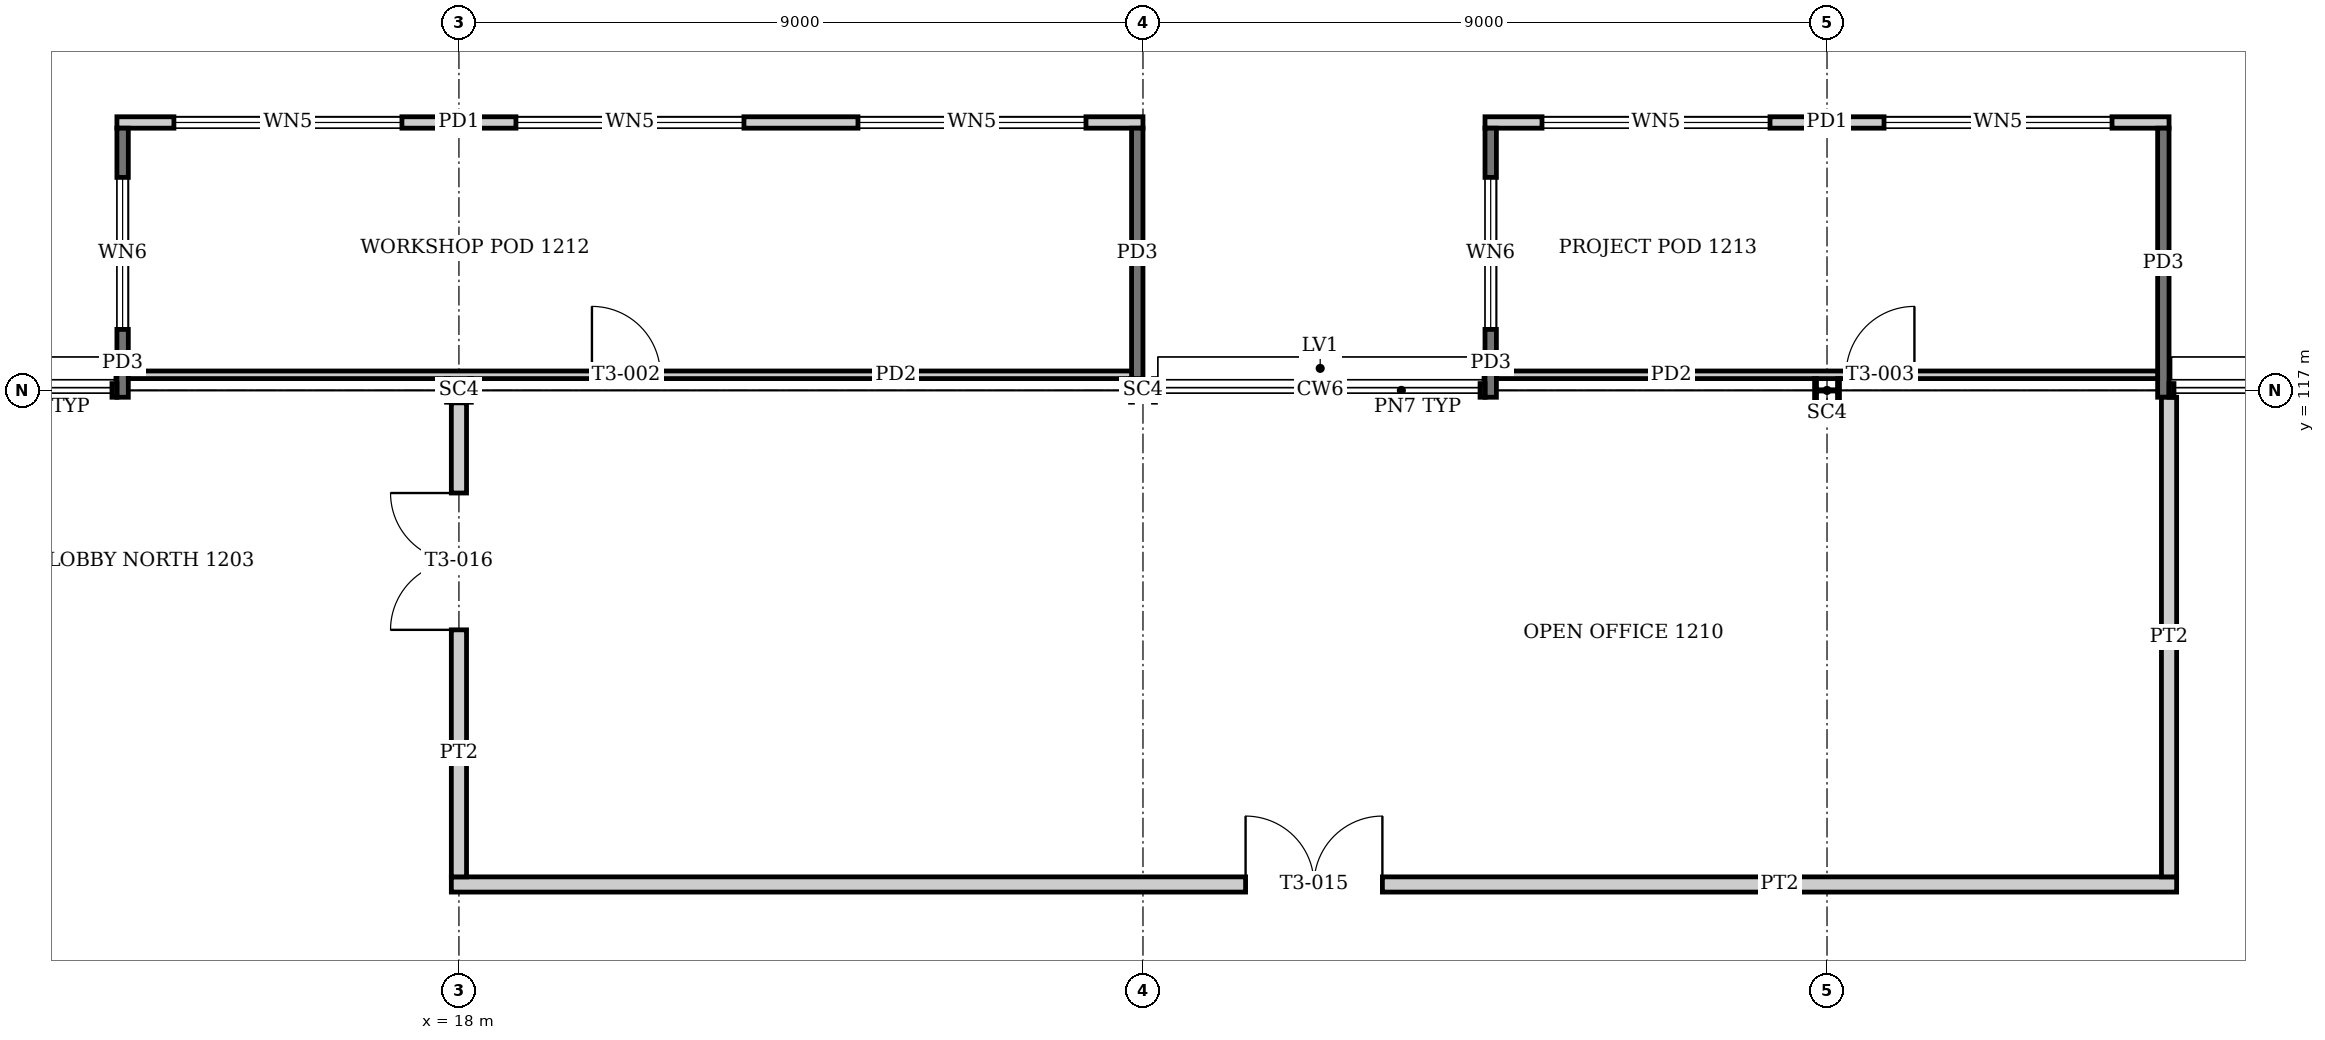
"""IFC4 building model, lengths in metres.
Left out: names, types, materials, properties, quantities, classifications, styles, units other than length and angle.
Written with IfcOpenShell. Run it as: python <this file> out.ifc"""

import sys

from ifc_helpers import new_model, si_unit, direction, frame, frame_2d, origin, origin_2d, place, context, subcontext, project, spatial, rectangle, i_section, extrude, element, fill, save


model = new_model("IFC4")
c1 = context("Model", 3, precision=1e-05, world=origin(), true_north=direction((0.0, 1.0)))
c2 = subcontext(c1, "Body", "Model", "MODEL_VIEW")
j1 = project(units=[si_unit("LENGTHUNIT", "METRE"), si_unit("PLANEANGLEUNIT", "RADIAN")], contexts=[c1])
p1 = place(None, origin())
s1 = spatial("IfcSite", under=j1, at=p1, CompositionType="ELEMENT")
p2 = place(p1, origin())
s2 = spatial("IfcBuilding", under=s1, at=p2, CompositionType="ELEMENT")
p3 = place(p2, frame((0.0, 0.0, 51.2)))
s3 = spatial("IfcBuildingStorey", under=s2, at=p3, CompositionType="ELEMENT", Elevation=51.2)
for number, where, z_axis, x_axis in (
    (1, (18.0, 117.0, 0.0), (0.0, 0.0, 1.0), (0.0, 1.0, 0.0)),
    (2, (27.0, 117.0, 0.0), (0.0, 0.0, 1.0), (0.0, 1.0, 0.0)),
    (3, (36.0, 117.0, 0.0), (0.0, 0.0, 1.0), (0.0, 1.0, 0.0)),
):
    element("IfcColumn", number, at=place(p3, frame(where, z_axis=z_axis, x_axis=x_axis)), inside=s3, PredefinedType="COLUMN", context=c2, shape_type="SweptSolid", body=[
        extrude(i_section(OverallWidth=0.311, OverallDepth=0.327, WebThickness=0.016, FlangeThickness=0.025, at=origin_2d()), origin(), (0.0, 0.0, 1.0), 4.0),
    ])
p4 = place(p3, frame((13.5, 120.525, 0.0), z_axis=(0.0, 0.0, 1.0), x_axis=(1.0, 0.0, 0.0)))
e4 = element("IfcWall", 4, at=p4, inside=s3, PredefinedType="SOLIDWALL", context=c2, shape_type="SweptSolid", body=[
    extrude(rectangle(XDim=13.5, YDim=0.15, at=frame_2d((6.75, 0.0))), origin(), (0.0, 0.0, 1.0), 2.6),
])
p5 = place(p4, frame((0.75, 0.0, 0.9)))
e5 = element("IfcOpeningElement", 5, at=p5, cuts=e4, PredefinedType="OPENING", context=c2, shape_type="SweptSolid", body=[
    extrude(rectangle(XDim=3.0, YDim=1.4, at=frame_2d((1.5, 0.7))), frame((0.0, 0.085, 0.0), z_axis=(0.0, -1.0, 0.0), x_axis=(1.0, 0.0, 0.0)), (0.0, 0.0, 1.0), 0.17),
])
p6 = place(p4, frame((5.25, 0.0, 0.9)))
e6 = element("IfcOpeningElement", 6, at=p6, cuts=e4, PredefinedType="OPENING", context=c2, shape_type="SweptSolid", body=[
    extrude(rectangle(XDim=3.0, YDim=1.4, at=frame_2d((1.5, 0.7))), frame((0.0, 0.085, 0.0), z_axis=(0.0, -1.0, 0.0), x_axis=(1.0, 0.0, 0.0)), (0.0, 0.0, 1.0), 0.17),
])
p7 = place(p4, frame((9.75, 0.0, 0.9)))
e7 = element("IfcOpeningElement", 7, at=p7, cuts=e4, PredefinedType="OPENING", context=c2, shape_type="SweptSolid", body=[
    extrude(rectangle(XDim=3.0, YDim=1.4, at=frame_2d((1.5, 0.7))), frame((0.0, 0.085, 0.0), z_axis=(0.0, -1.0, 0.0), x_axis=(1.0, 0.0, 0.0)), (0.0, 0.0, 1.0), 0.17),
])
p8 = place(p3, frame((13.575, 120.45, -0.15), z_axis=(0.0, 0.0, 1.0), x_axis=(0.0, -1.0, 0.0)))
e8 = element("IfcWall", 8, at=p8, inside=s3, PredefinedType="SOLIDWALL", context=c2, shape_type="SweptSolid", body=[
    extrude(rectangle(XDim=3.54, YDim=0.15, at=frame_2d((1.77, 0.0))), origin(), (0.0, 0.0, 1.0), 2.75),
])
p9 = place(p8, frame((0.647, 0.0, 1.05)))
e9 = element("IfcOpeningElement", 9, at=p9, cuts=e8, PredefinedType="OPENING", context=c2, shape_type="SweptSolid", body=[
    extrude(rectangle(XDim=2.0, YDim=1.4, at=frame_2d((1.0, 0.7))), frame((0.0, 0.085, 0.0), z_axis=(0.0, -1.0, 0.0), x_axis=(1.0, 0.0, 0.0)), (0.0, 0.0, 1.0), 0.17),
])
p10 = place(p3, frame((26.925, 120.45, -0.15), z_axis=(0.0, 0.0, 1.0), x_axis=(0.0, -1.0, 0.0)))
e10 = element("IfcWall", 10, at=p10, inside=s3, PredefinedType="SOLIDWALL", context=c2, shape_type="SweptSolid", body=[
    extrude(rectangle(XDim=3.294, YDim=0.15, at=frame_2d((1.647, 0.0))), origin(), (0.0, 0.0, 1.0), 2.75),
])
p11 = place(p3, frame((13.65, 117.206, 0.0), z_axis=(0.0, 0.0, 1.0), x_axis=(1.0, 0.0, 0.0)))
e11 = element("IfcWall", 11, at=p11, inside=s3, PredefinedType="PARTITIONING", context=c2, shape_type="SweptSolid", body=[
    extrude(rectangle(XDim=13.2, YDim=0.1, at=frame_2d((6.6, 0.0))), origin(), (0.0, 0.0, 1.0), 2.6),
])
p12 = place(p11, frame((6.1, 0.0, 0.0)))
e12 = element("IfcOpeningElement", 12, at=p12, cuts=e11, PredefinedType="OPENING", context=c2, shape_type="SweptSolid", body=[
    extrude(rectangle(XDim=0.9, YDim=2.1, at=frame_2d((0.45, 1.05))), frame((0.0, 0.06, 0.0), z_axis=(0.0, -1.0, 0.0), x_axis=(1.0, 0.0, 0.0)), (0.0, 0.0, 1.0), 0.12),
])
p13 = place(p3, frame((31.5, 120.525, 0.0), z_axis=(0.0, 0.0, 1.0), x_axis=(1.0, 0.0, 0.0)))
e13 = element("IfcWall", 13, at=p13, inside=s3, PredefinedType="SOLIDWALL", context=c2, shape_type="SweptSolid", body=[
    extrude(rectangle(XDim=9.0, YDim=0.15, at=frame_2d((4.5, 0.0))), origin(), (0.0, 0.0, 1.0), 2.6),
])
p14 = place(p13, frame((0.75, 0.0, 0.9)))
e14 = element("IfcOpeningElement", 14, at=p14, cuts=e13, PredefinedType="OPENING", context=c2, shape_type="SweptSolid", body=[
    extrude(rectangle(XDim=3.0, YDim=1.4, at=frame_2d((1.5, 0.7))), frame((0.0, 0.085, 0.0), z_axis=(0.0, -1.0, 0.0), x_axis=(1.0, 0.0, 0.0)), (0.0, 0.0, 1.0), 0.17),
])
p15 = place(p13, frame((5.25, 0.0, 0.9)))
e15 = element("IfcOpeningElement", 15, at=p15, cuts=e13, PredefinedType="OPENING", context=c2, shape_type="SweptSolid", body=[
    extrude(rectangle(XDim=3.0, YDim=1.4, at=frame_2d((1.5, 0.7))), frame((0.0, 0.085, 0.0), z_axis=(0.0, -1.0, 0.0), x_axis=(1.0, 0.0, 0.0)), (0.0, 0.0, 1.0), 0.17),
])
p16 = place(p3, frame((31.575, 120.45, -0.15), z_axis=(0.0, 0.0, 1.0), x_axis=(0.0, -1.0, 0.0)))
e16 = element("IfcWall", 16, at=p16, inside=s3, PredefinedType="SOLIDWALL", context=c2, shape_type="SweptSolid", body=[
    extrude(rectangle(XDim=3.54, YDim=0.15, at=frame_2d((1.77, 0.0))), origin(), (0.0, 0.0, 1.0), 2.75),
])
p17 = place(p16, frame((0.647, 0.0, 1.05)))
e17 = element("IfcOpeningElement", 17, at=p17, cuts=e16, PredefinedType="OPENING", context=c2, shape_type="SweptSolid", body=[
    extrude(rectangle(XDim=2.0, YDim=1.4, at=frame_2d((1.0, 0.7))), frame((0.0, 0.085, 0.0), z_axis=(0.0, -1.0, 0.0), x_axis=(1.0, 0.0, 0.0)), (0.0, 0.0, 1.0), 0.17),
])
p18 = place(p3, frame((40.425, 120.45, -0.15), z_axis=(0.0, 0.0, 1.0), x_axis=(0.0, -1.0, 0.0)))
e18 = element("IfcWall", 18, at=p18, inside=s3, PredefinedType="SOLIDWALL", context=c2, shape_type="SweptSolid", body=[
    extrude(rectangle(XDim=3.54, YDim=0.15, at=frame_2d((1.77, 0.0))), origin(), (0.0, 0.0, 1.0), 2.75),
])
p19 = place(p3, frame((31.65, 117.206, 0.0), z_axis=(0.0, 0.0, 1.0), x_axis=(1.0, 0.0, 0.0)))
e19 = element("IfcWall", 19, at=p19, inside=s3, PredefinedType="PARTITIONING", context=c2, shape_type="SweptSolid", body=[
    extrude(rectangle(XDim=8.7, YDim=0.1, at=frame_2d((4.35, 0.0))), origin(), (0.0, 0.0, 1.0), 2.6),
])
p20 = place(p19, frame((4.6, 0.0, 0.0)))
e20 = element("IfcOpeningElement", 20, at=p20, cuts=e19, PredefinedType="OPENING", context=c2, shape_type="SweptSolid", body=[
    extrude(rectangle(XDim=0.9, YDim=2.1, at=frame_2d((0.45, 1.05))), frame((0.0, 0.06, 0.0), z_axis=(0.0, -1.0, 0.0), x_axis=(1.0, 0.0, 0.0)), (0.0, 0.0, 1.0), 0.12),
])
p21 = place(p3, frame((17.9, 110.5, 0.0), z_axis=(0.0, 0.0, 1.0), x_axis=(1.0, 0.0, 0.0)))
e21 = element("IfcWall", 21, at=p21, inside=s3, PredefinedType="PARTITIONING", context=c2, shape_type="SweptSolid", body=[
    extrude(rectangle(XDim=22.7, YDim=0.2, at=frame_2d((11.35, 0.0))), origin(), (0.0, 0.0, 1.0), 3.05),
])
p22 = place(p21, frame((10.45, 0.0, 0.0)))
e22 = element("IfcOpeningElement", 22, at=p22, cuts=e21, PredefinedType="OPENING", context=c2, shape_type="SweptSolid", body=[
    extrude(rectangle(XDim=1.8, YDim=2.1, at=frame_2d((0.9, 1.05))), frame((0.0, 0.11, 0.0), z_axis=(0.0, -1.0, 0.0), x_axis=(1.0, 0.0, 0.0)), (0.0, 0.0, 1.0), 0.22),
])
p23 = place(p3, frame((18.0, 110.6, 0.0), z_axis=(0.0, 0.0, 1.0), x_axis=(0.0, 1.0, 0.0)))
e23 = element("IfcWall", 23, at=p23, inside=s3, PredefinedType="PARTITIONING", context=c2, shape_type="SweptSolid", body=[
    extrude(rectangle(XDim=6.236, YDim=0.2, at=frame_2d((3.118, 0.0))), origin(), (0.0, 0.0, 1.0), 3.05),
])
p24 = place(p23, frame((3.25, 0.0, 0.0)))
e24 = element("IfcOpeningElement", 24, at=p24, cuts=e23, PredefinedType="OPENING", context=c2, shape_type="SweptSolid", body=[
    extrude(rectangle(XDim=1.8, YDim=2.1, at=frame_2d((0.9, 1.05))), frame((0.0, 0.11, 0.0), z_axis=(0.0, -1.0, 0.0), x_axis=(1.0, 0.0, 0.0)), (0.0, 0.0, 1.0), 0.22),
])
p25 = place(p3, frame((40.5, 110.6, 0.0), z_axis=(0.0, 0.0, 1.0), x_axis=(0.0, 1.0, 0.0)))
e25 = element("IfcWall", 25, at=p25, inside=s3, PredefinedType="PARTITIONING", context=c2, shape_type="SweptSolid", body=[
    extrude(rectangle(XDim=6.31, YDim=0.2, at=frame_2d((3.155, 0.0))), origin(), (0.0, 0.0, 1.0), 3.05),
])
p26 = place(p5, origin())
e26 = element("IfcWindow", 26, at=p26, inside=s3, PartitioningType="SINGLE_PANEL", PredefinedType="WINDOW", context=c2, shape_type="SweptSolid", body=[
    extrude(rectangle(XDim=3.0, YDim=1.4, at=frame_2d((1.5, 0.7))), frame((0.0, 0.03, 0.0), z_axis=(0.0, -1.0, 0.0), x_axis=(1.0, 0.0, 0.0)), (0.0, 0.0, 1.0), 0.06),
])
fill(e5, e26)
p27 = place(p6, origin())
e27 = element("IfcWindow", 27, at=p27, inside=s3, PartitioningType="SINGLE_PANEL", PredefinedType="WINDOW", context=c2, shape_type="SweptSolid", body=[
    extrude(rectangle(XDim=3.0, YDim=1.4, at=frame_2d((1.5, 0.7))), frame((0.0, 0.03, 0.0), z_axis=(0.0, -1.0, 0.0), x_axis=(1.0, 0.0, 0.0)), (0.0, 0.0, 1.0), 0.06),
])
fill(e6, e27)
p28 = place(p7, origin())
e28 = element("IfcWindow", 28, at=p28, inside=s3, PartitioningType="SINGLE_PANEL", PredefinedType="WINDOW", context=c2, shape_type="SweptSolid", body=[
    extrude(rectangle(XDim=3.0, YDim=1.4, at=frame_2d((1.5, 0.7))), frame((0.0, 0.03, 0.0), z_axis=(0.0, -1.0, 0.0), x_axis=(1.0, 0.0, 0.0)), (0.0, 0.0, 1.0), 0.06),
])
fill(e7, e28)
p29 = place(p9, origin())
e29 = element("IfcWindow", 29, at=p29, inside=s3, PartitioningType="SINGLE_PANEL", PredefinedType="WINDOW", context=c2, shape_type="SweptSolid", body=[
    extrude(rectangle(XDim=2.0, YDim=1.4, at=frame_2d((1.0, 0.7))), frame((0.0, 0.03, 0.0), z_axis=(0.0, -1.0, 0.0), x_axis=(1.0, 0.0, 0.0)), (0.0, 0.0, 1.0), 0.06),
])
fill(e9, e29)
p30 = place(p12, origin())
e30 = element("IfcDoor", 30, at=p30, inside=s3, OperationType="SINGLE_SWING_LEFT", PredefinedType="DOOR", context=c2, shape_type="SweptSolid", body=[
    extrude(rectangle(XDim=0.9, YDim=2.1, at=frame_2d((0.45, 1.05))), frame((0.0, 0.025, 0.0), z_axis=(0.0, -1.0, 0.0), x_axis=(1.0, 0.0, 0.0)), (0.0, 0.0, 1.0), 0.05),
])
fill(e12, e30)
p31 = place(p14, origin())
e31 = element("IfcWindow", 31, at=p31, inside=s3, PartitioningType="SINGLE_PANEL", PredefinedType="WINDOW", context=c2, shape_type="SweptSolid", body=[
    extrude(rectangle(XDim=3.0, YDim=1.4, at=frame_2d((1.5, 0.7))), frame((0.0, 0.03, 0.0), z_axis=(0.0, -1.0, 0.0), x_axis=(1.0, 0.0, 0.0)), (0.0, 0.0, 1.0), 0.06),
])
fill(e14, e31)
p32 = place(p15, origin())
e32 = element("IfcWindow", 32, at=p32, inside=s3, PartitioningType="SINGLE_PANEL", PredefinedType="WINDOW", context=c2, shape_type="SweptSolid", body=[
    extrude(rectangle(XDim=3.0, YDim=1.4, at=frame_2d((1.5, 0.7))), frame((0.0, 0.03, 0.0), z_axis=(0.0, -1.0, 0.0), x_axis=(1.0, 0.0, 0.0)), (0.0, 0.0, 1.0), 0.06),
])
fill(e15, e32)
p33 = place(p17, origin())
e33 = element("IfcWindow", 33, at=p33, inside=s3, PartitioningType="SINGLE_PANEL", PredefinedType="WINDOW", context=c2, shape_type="SweptSolid", body=[
    extrude(rectangle(XDim=2.0, YDim=1.4, at=frame_2d((1.0, 0.7))), frame((0.0, 0.03, 0.0), z_axis=(0.0, -1.0, 0.0), x_axis=(1.0, 0.0, 0.0)), (0.0, 0.0, 1.0), 0.06),
])
fill(e17, e33)
p34 = place(p20, origin())
e34 = element("IfcDoor", 34, at=p34, inside=s3, OperationType="SINGLE_SWING_RIGHT", PredefinedType="DOOR", context=c2, shape_type="SweptSolid", body=[
    extrude(rectangle(XDim=0.9, YDim=2.1, at=frame_2d((0.45, 1.05))), frame((0.0, 0.025, 0.0), z_axis=(0.0, -1.0, 0.0), x_axis=(1.0, 0.0, 0.0)), (0.0, 0.0, 1.0), 0.05),
])
fill(e20, e34)
p35 = place(p22, origin())
e35 = element("IfcDoor", 35, at=p35, inside=s3, OperationType="DOUBLE_DOOR_SINGLE_SWING", PredefinedType="DOOR", context=c2, shape_type="SweptSolid", body=[
    extrude(rectangle(XDim=1.8, YDim=2.1, at=frame_2d((0.9, 1.05))), frame((0.0, 0.025, 0.0), z_axis=(0.0, -1.0, 0.0), x_axis=(1.0, 0.0, 0.0)), (0.0, 0.0, 1.0), 0.05),
])
fill(e22, e35)
p36 = place(p24, origin())
e36 = element("IfcDoor", 36, at=p36, inside=s3, OperationType="DOUBLE_DOOR_SINGLE_SWING", PredefinedType="DOOR", context=c2, shape_type="SweptSolid", body=[
    extrude(rectangle(XDim=1.8, YDim=2.1, at=frame_2d((0.9, 1.05))), frame((0.0, 0.025, 0.0), z_axis=(0.0, -1.0, 0.0), x_axis=(1.0, 0.0, 0.0)), (0.0, 0.0, 1.0), 0.05),
])
fill(e24, e36)
save(model, sys.argv[1])
